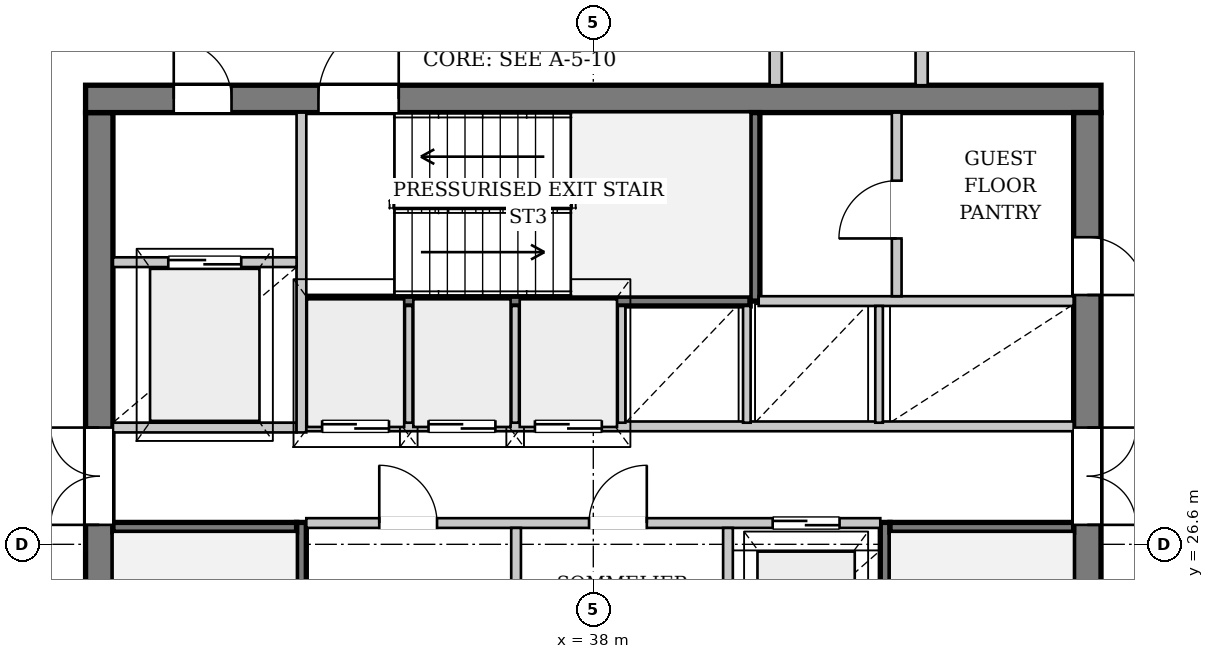
"""IFC4 building model, lengths in metres.
Left out: names, types, materials, properties, quantities, classifications, styles, units other than length and angle.
Written with IfcOpenShell. Run it as: python <this file> out.ifc"""

import sys

from ifc_helpers import new_model, si_unit, direction, frame, frame_2d, origin, place, context, subcontext, project, spatial, rectangle, extrude, source, transform, mapped, element, fill, save


model = new_model("IFC4")
c1 = context("Model", 3, precision=1e-05, world=origin(), true_north=direction((0.0, 1.0)))
c2 = subcontext(c1, "Body", "Model", "MODEL_VIEW")
j1 = project(units=[si_unit("LENGTHUNIT", "METRE"), si_unit("PLANEANGLEUNIT", "RADIAN")], contexts=[c1])
p1 = place(None, origin())
s1 = spatial("IfcSite", under=j1, at=p1, CompositionType="ELEMENT")
p2 = place(p1, origin())
s2 = spatial("IfcBuilding", under=s1, at=p2, CompositionType="ELEMENT")
p3 = place(p2, frame((0.0, 0.0, 274.1)))
s3 = spatial("IfcBuildingStorey", under=s2, at=p3, CompositionType="ELEMENT", Elevation=274.1)
p4 = place(p3, frame((51.126, 27.473, 0.0), z_axis=(0.0, 0.0, 1.0), x_axis=(-0.201040285464, -0.979582974342, 0.0)))
e1 = element("IfcWall", 1, at=p4, inside=s3, PredefinedType="SOLIDWALL", context=c2, shape_type="SweptSolid", body=[
    extrude(rectangle(XDim=22.119, YDim=0.32, at=frame_2d((11.06, 0.0))), origin(), (0.0, 0.0, 1.0), 2.812),
])
p5 = place(p4, frame((6.328, 0.0, 0.0)))
e2 = element("IfcOpeningElement", 2, at=p5, cuts=e1, PredefinedType="OPENING", context=c2, shape_type="SweptSolid", body=[
    extrude(rectangle(XDim=1.5, YDim=2.3, at=frame_2d((0.75, 1.15))), frame((0.0, 0.17, 0.0), z_axis=(0.0, -1.0, 0.0), x_axis=(1.0, 0.0, 0.0)), (0.0, 0.0, 1.0), 0.34),
])
p6 = place(p4, frame((15.268, 0.0, 0.342)))
e3 = element("IfcOpeningElement", 3, at=p6, cuts=e1, PredefinedType="OPENING", context=c2, shape_type="SweptSolid", body=[
    extrude(rectangle(XDim=2.6, YDim=2.35, at=frame_2d((1.3, 1.175))), frame((0.0, 0.17, 0.0), z_axis=(0.0, -1.0, 0.0), x_axis=(1.0, 0.0, 0.0)), (0.0, 0.0, 1.0), 0.34),
])
p7 = place(p3, frame((16.162, 25.477, 0.0), z_axis=(0.0, 0.0, 1.0), x_axis=(0.777216193482, 0.629233651825, 0.0)))
e4 = element("IfcWall", 4, at=p7, inside=s3, PredefinedType="SOLIDWALL", context=c2, shape_type="SweptSolid", body=[
    extrude(rectangle(XDim=21.611, YDim=0.38, at=frame_2d((10.805, 0.0))), origin(), (0.0, 0.0, 1.0), 2.812),
])
p8 = place(p7, frame((4.951, 0.0, 0.442)))
e5 = element("IfcOpeningElement", 5, at=p8, cuts=e4, PredefinedType="OPENING", context=c2, shape_type="SweptSolid", body=[
    extrude(rectangle(XDim=2.2, YDim=2.25, at=frame_2d((1.1, 1.125))), frame((0.0, 0.2, 0.0), z_axis=(0.0, -1.0, 0.0), x_axis=(1.0, 0.0, 0.0)), (0.0, 0.0, 1.0), 0.4),
])
p9 = place(p7, frame((17.46, 0.0, 0.442)))
e6 = element("IfcOpeningElement", 6, at=p9, cuts=e4, PredefinedType="OPENING", context=c2, shape_type="SweptSolid", body=[
    extrude(rectangle(XDim=2.2, YDim=2.25, at=frame_2d((1.1, 1.125))), frame((0.0, 0.2, 0.0), z_axis=(0.0, -1.0, 0.0), x_axis=(1.0, 0.0, 0.0)), (0.0, 0.0, 1.0), 0.4),
])
p10 = place(p3, frame((29.875, 19.5, 0.0), z_axis=(0.0, 0.0, 1.0), x_axis=(0.0, 1.0, 0.0)))
e7 = element("IfcWall", 7, at=p10, inside=s3, PredefinedType="SHEAR", context=c2, shape_type="SweptSolid", body=[
    extrude(rectangle(XDim=14.2, YDim=0.45, at=frame_2d((7.1, 0.0))), origin(), (0.0, 0.0, 1.0), 3.32),
])
p11 = place(p10, frame((7.42, 0.0, 0.0)))
e8 = element("IfcOpeningElement", 8, at=p11, cuts=e7, PredefinedType="OPENING", context=c2, shape_type="SweptSolid", body=[
    extrude(rectangle(XDim=1.6, YDim=2.2, at=frame_2d((0.8, 1.1))), frame((0.0, 0.235, 0.0), z_axis=(0.0, -1.0, 0.0), x_axis=(1.0, 0.0, 0.0)), (0.0, 0.0, 1.0), 0.47),
])
p12 = place(p3, frame((29.65, 33.925, 0.0), z_axis=(0.0, 0.0, 1.0), x_axis=(1.0, 0.0, 0.0)))
e9 = element("IfcWall", 9, at=p12, inside=s3, PredefinedType="SHEAR", context=c2, shape_type="SweptSolid", body=[
    extrude(rectangle(XDim=16.7, YDim=0.45, at=frame_2d((8.35, 0.0))), origin(), (0.0, 0.0, 1.0), 3.32),
])
p13 = place(p12, frame((1.45, 0.0, 0.0)))
e10 = element("IfcOpeningElement", 10, at=p13, cuts=e9, PredefinedType="OPENING", context=c2, shape_type="SweptSolid", body=[
    extrude(rectangle(XDim=0.95, YDim=2.1, at=frame_2d((0.475, 1.05))), frame((0.0, 0.235, 0.0), z_axis=(0.0, -1.0, 0.0), x_axis=(1.0, 0.0, 0.0)), (0.0, 0.0, 1.0), 0.47),
])
p14 = place(p12, frame((3.83, 0.0, 0.0)))
e11 = element("IfcOpeningElement", 11, at=p14, cuts=e9, PredefinedType="OPENING", context=c2, shape_type="SweptSolid", body=[
    extrude(rectangle(XDim=1.32, YDim=2.2, at=frame_2d((0.66, 1.1))), frame((0.0, 0.235, 0.0), z_axis=(0.0, -1.0, 0.0), x_axis=(1.0, 0.0, 0.0)), (0.0, 0.0, 1.0), 0.47),
])
p15 = place(p3, frame((46.125, 33.7, 0.0), z_axis=(0.0, 0.0, 1.0), x_axis=(0.0, -1.0, 0.0)))
e12 = element("IfcWall", 12, at=p15, inside=s3, PredefinedType="SHEAR", context=c2, shape_type="SweptSolid", body=[
    extrude(rectangle(XDim=14.2, YDim=0.45, at=frame_2d((7.1, 0.0))), origin(), (0.0, 0.0, 1.0), 3.32),
])
p16 = place(p15, frame((5.18, 0.0, 0.0)))
e13 = element("IfcOpeningElement", 13, at=p16, cuts=e12, PredefinedType="OPENING", context=c2, shape_type="SweptSolid", body=[
    extrude(rectangle(XDim=1.6, YDim=2.2, at=frame_2d((0.8, 1.1))), frame((0.0, 0.235, 0.0), z_axis=(0.0, -1.0, 0.0), x_axis=(1.0, 0.0, 0.0)), (0.0, 0.0, 1.0), 0.47),
])
p17 = place(p15, frame((2.05, 0.0, 0.0)))
e14 = element("IfcOpeningElement", 14, at=p17, cuts=e12, PredefinedType="OPENING", context=c2, shape_type="SweptSolid", body=[
    extrude(rectangle(XDim=0.95, YDim=2.1, at=frame_2d((0.475, 1.05))), frame((0.0, 0.235, 0.0), z_axis=(0.0, -1.0, 0.0), x_axis=(1.0, 0.0, 0.0)), (0.0, 0.0, 1.0), 0.47),
])
p18 = place(p3, frame((33.2, 19.5, 0.0), z_axis=(0.0, 0.0, 1.0), x_axis=(0.0, 1.0, 0.0)))
e15 = element("IfcWall", 15, at=p18, inside=s3, PredefinedType="PARTITIONING", context=c2, shape_type="SweptSolid", body=[
    extrude(rectangle(XDim=7.46, YDim=0.16, at=frame_2d((3.73, 0.0))), origin(), (0.0, 0.0, 1.0), 3.32),
])
p19 = place(p18, frame((0.08, 0.0, 0.0)))
e16 = element("IfcOpeningElement", 16, at=p19, cuts=e15, PredefinedType="OPENING", context=c2, shape_type="SweptSolid", body=[
    extrude(rectangle(XDim=1.32, YDim=2.2, at=frame_2d((0.66, 1.1))), frame((0.0, 0.09, 0.0), z_axis=(0.0, -1.0, 0.0), x_axis=(1.0, 0.0, 0.0)), (0.0, 0.0, 1.0), 0.18),
])
p20 = place(p3, frame((30.1, 26.88, 0.0), z_axis=(0.0, 0.0, 1.0), x_axis=(1.0, 0.0, 0.0)))
e17 = element("IfcWall", 17, at=p20, inside=s3, PredefinedType="PARTITIONING", context=c2, shape_type="SweptSolid", body=[
    extrude(rectangle(XDim=3.02, YDim=0.16, at=frame_2d((1.51, 0.0))), origin(), (0.0, 0.0, 1.0), 3.32),
])
p21 = place(p3, frame((42.8, 26.96, 0.0), z_axis=(0.0, 0.0, 1.0), x_axis=(0.0, -1.0, 0.0)))
e18 = element("IfcWall", 18, at=p21, inside=s3, PredefinedType="PARTITIONING", context=c2, shape_type="SweptSolid", body=[
    extrude(rectangle(XDim=7.46, YDim=0.16, at=frame_2d((3.73, 0.0))), origin(), (0.0, 0.0, 1.0), 3.32),
])
p22 = place(p21, frame((6.06, 0.0, 0.0)))
e19 = element("IfcOpeningElement", 19, at=p22, cuts=e18, PredefinedType="OPENING", context=c2, shape_type="SweptSolid", body=[
    extrude(rectangle(XDim=1.32, YDim=2.2, at=frame_2d((0.66, 1.1))), frame((0.0, 0.09, 0.0), z_axis=(0.0, -1.0, 0.0), x_axis=(1.0, 0.0, 0.0)), (0.0, 0.0, 1.0), 0.18),
])
p23 = place(p3, frame((42.88, 26.88, 0.0), z_axis=(0.0, 0.0, 1.0), x_axis=(1.0, 0.0, 0.0)))
e20 = element("IfcWall", 20, at=p23, inside=s3, PredefinedType="PARTITIONING", context=c2, shape_type="SweptSolid", body=[
    extrude(rectangle(XDim=3.02, YDim=0.16, at=frame_2d((1.51, 0.0))), origin(), (0.0, 0.0, 1.0), 3.32),
])
p24 = place(p3, frame((33.28, 30.6, 0.0), z_axis=(0.0, 0.0, 1.0), x_axis=(1.0, 0.0, 0.0)))
e21 = element("IfcWall", 21, at=p24, inside=s3, PredefinedType="PARTITIONING", context=c2, shape_type="SweptSolid", body=[
    extrude(rectangle(XDim=7.3, YDim=0.16, at=frame_2d((3.65, 0.0))), origin(), (0.0, 0.0, 1.0), 3.32),
])
p25 = place(p3, frame((40.66, 30.6, 0.0), z_axis=(0.0, 0.0, 1.0), x_axis=(0.0, 1.0, 0.0)))
e22 = element("IfcWall", 22, at=p25, inside=s3, PredefinedType="PARTITIONING", context=c2, shape_type="SweptSolid", body=[
    extrude(rectangle(XDim=3.1, YDim=0.16, at=frame_2d((1.55, 0.0))), origin(), (0.0, 0.0, 1.0), 3.32),
])
p26 = place(p3, frame((30.1, 28.52, 0.0), z_axis=(0.0, 0.0, 1.0), x_axis=(1.0, 0.0, 0.0)))
e23 = element("IfcWall", 23, at=p26, inside=s3, PredefinedType="PARTITIONING", context=c2, shape_type="SweptSolid", body=[
    extrude(rectangle(XDim=3.02, YDim=0.16, at=frame_2d((1.51, 0.0))), origin(), (0.0, 0.0, 1.0), 3.32),
])
p27 = place(p3, frame((33.2, 28.44, 0.0), z_axis=(0.0, 0.0, 1.0), x_axis=(0.0, 1.0, 0.0)))
e24 = element("IfcWall", 24, at=p27, inside=s3, PredefinedType="PARTITIONING", context=c2, shape_type="SweptSolid", body=[
    extrude(rectangle(XDim=5.26, YDim=0.16, at=frame_2d((2.63, 0.0))), origin(), (0.0, 0.0, 1.0), 3.32),
])
p28 = place(p3, frame((30.1, 31.24, 0.0), z_axis=(0.0, 0.0, 1.0), x_axis=(1.0, 0.0, 0.0)))
e25 = element("IfcWall", 25, at=p28, inside=s3, PredefinedType="PARTITIONING", context=c2, shape_type="SweptSolid", body=[
    extrude(rectangle(XDim=3.02, YDim=0.16, at=frame_2d((1.51, 0.0))), origin(), (0.0, 0.0, 1.0), 3.32),
])
p29 = place(p28, frame((0.91, 0.0, 0.0)))
e26 = element("IfcOpeningElement", 26, at=p29, cuts=e25, PredefinedType="OPENING", context=c2, shape_type="SweptSolid", body=[
    extrude(rectangle(XDim=1.2, YDim=2.2, at=frame_2d((0.6, 1.1))), frame((0.0, 0.09, 0.0), z_axis=(0.0, -1.0, 0.0), x_axis=(1.0, 0.0, 0.0)), (0.0, 0.0, 1.0), 0.18),
])
p30 = place(p3, frame((33.28, 26.95, 0.0), z_axis=(0.0, 0.0, 1.0), x_axis=(1.0, 0.0, 0.0)))
e27 = element("IfcWall", 27, at=p30, inside=s3, PredefinedType="PARTITIONING", context=c2, shape_type="SweptSolid", body=[
    extrude(rectangle(XDim=9.44, YDim=0.16, at=frame_2d((4.72, 0.0))), origin(), (0.0, 0.0, 1.0), 3.32),
])
p31 = place(p30, frame((1.2, 0.0, 0.0)))
e28 = element("IfcOpeningElement", 28, at=p31, cuts=e27, PredefinedType="OPENING", context=c2, shape_type="SweptSolid", body=[
    extrude(rectangle(XDim=0.95, YDim=2.1, at=frame_2d((0.475, 1.05))), frame((0.0, 0.09, 0.0), z_axis=(0.0, -1.0, 0.0), x_axis=(1.0, 0.0, 0.0)), (0.0, 0.0, 1.0), 0.18),
])
p32 = place(p30, frame((4.65, 0.0, 0.0)))
e29 = element("IfcOpeningElement", 29, at=p32, cuts=e27, PredefinedType="OPENING", context=c2, shape_type="SweptSolid", body=[
    extrude(rectangle(XDim=0.95, YDim=2.1, at=frame_2d((0.475, 1.05))), frame((0.0, 0.09, 0.0), z_axis=(0.0, -1.0, 0.0), x_axis=(1.0, 0.0, 0.0)), (0.0, 0.0, 1.0), 0.18),
])
p33 = place(p30, frame((7.67, 0.0, 0.0)))
e30 = element("IfcOpeningElement", 30, at=p33, cuts=e27, PredefinedType="OPENING", context=c2, shape_type="SweptSolid", body=[
    extrude(rectangle(XDim=1.1, YDim=2.2, at=frame_2d((0.55, 1.1))), frame((0.0, 0.09, 0.0), z_axis=(0.0, -1.0, 0.0), x_axis=(1.0, 0.0, 0.0)), (0.0, 0.0, 1.0), 0.18),
])
for number, where, z_axis, x_axis in (
    (31, (36.73, 24.56, 0.0), (0.0, 0.0, 1.0), (0.0, 1.0, 0.0)),
    (32, (40.215, 24.56, 0.0), (0.0, 0.0, 1.0), (0.0, 1.0, 0.0)),
):
    element("IfcWall", number, at=place(p3, frame(where, z_axis=z_axis, x_axis=x_axis)), inside=s3, PredefinedType="PARTITIONING", context=c2, shape_type="SweptSolid", body=[
        extrude(rectangle(XDim=2.31, YDim=0.16, at=frame_2d((1.155, 0.0))), origin(), (0.0, 0.0, 1.0), 3.32),
    ])
p34 = place(p3, frame((33.28, 28.54, 0.0), z_axis=(0.0, 0.0, 1.0), x_axis=(1.0, 0.0, 0.0)))
e33 = element("IfcWall", 33, at=p34, inside=s3, PredefinedType="PARTITIONING", context=c2, shape_type="SweptSolid", body=[
    extrude(rectangle(XDim=12.62, YDim=0.16, at=frame_2d((6.31, 0.0))), origin(), (0.0, 0.0, 1.0), 3.32),
])
p35 = place(p34, frame((0.26, 0.0, 0.0)))
e34 = element("IfcOpeningElement", 34, at=p35, cuts=e33, PredefinedType="OPENING", context=c2, shape_type="SweptSolid", body=[
    extrude(rectangle(XDim=1.1, YDim=2.2, at=frame_2d((0.55, 1.1))), frame((0.0, 0.09, 0.0), z_axis=(0.0, -1.0, 0.0), x_axis=(1.0, 0.0, 0.0)), (0.0, 0.0, 1.0), 0.18),
])
p36 = place(p34, frame((2.01, 0.0, 0.0)))
e35 = element("IfcOpeningElement", 35, at=p36, cuts=e33, PredefinedType="OPENING", context=c2, shape_type="SweptSolid", body=[
    extrude(rectangle(XDim=1.1, YDim=2.2, at=frame_2d((0.55, 1.1))), frame((0.0, 0.09, 0.0), z_axis=(0.0, -1.0, 0.0), x_axis=(1.0, 0.0, 0.0)), (0.0, 0.0, 1.0), 0.18),
])
p37 = place(p34, frame((3.76, 0.0, 0.0)))
e36 = element("IfcOpeningElement", 36, at=p37, cuts=e33, PredefinedType="OPENING", context=c2, shape_type="SweptSolid", body=[
    extrude(rectangle(XDim=1.1, YDim=2.2, at=frame_2d((0.55, 1.1))), frame((0.0, 0.09, 0.0), z_axis=(0.0, -1.0, 0.0), x_axis=(1.0, 0.0, 0.0)), (0.0, 0.0, 1.0), 0.18),
])
p38 = place(p3, frame((40.72, 30.6, 0.0), z_axis=(0.0, 0.0, 1.0), x_axis=(1.0, 0.0, 0.0)))
e37 = element("IfcWall", 37, at=p38, inside=s3, PredefinedType="PARTITIONING", context=c2, shape_type="SweptSolid", body=[
    extrude(rectangle(XDim=5.18, YDim=0.16, at=frame_2d((2.59, 0.0))), origin(), (0.0, 0.0, 1.0), 3.32),
])
for number, where, z_axis, x_axis in (
    (38, (34.965, 28.6, 0.0), (0.0, 0.0, 1.0), (0.0, 1.0, 0.0)),
    (39, (36.715, 28.6, 0.0), (0.0, 0.0, 1.0), (0.0, 1.0, 0.0)),
    (40, (38.465, 28.6, 0.0), (0.0, 0.0, 1.0), (0.0, 1.0, 0.0)),
    (41, (40.525, 28.6, 0.0), (0.0, 0.0, 1.0), (0.0, 1.0, 0.0)),
    (42, (42.7, 28.6, 0.0), (0.0, 0.0, 1.0), (0.0, 1.0, 0.0)),
):
    element("IfcWall", number, at=place(p3, frame(where, z_axis=z_axis, x_axis=x_axis)), inside=s3, PredefinedType="PARTITIONING", context=c2, shape_type="SweptSolid", body=[
        extrude(rectangle(XDim=1.92, YDim=0.125, at=frame_2d((0.96, 0.0))), origin(), (0.0, 0.0, 1.0), 3.32),
    ])
p39 = place(p3, frame((42.99, 30.68, 0.0), z_axis=(0.0, 0.0, 1.0), x_axis=(0.0, 1.0, 0.0)))
e43 = element("IfcWall", 43, at=p39, inside=s3, PredefinedType="PARTITIONING", context=c2, shape_type="SweptSolid", body=[
    extrude(rectangle(XDim=3.02, YDim=0.16, at=frame_2d((1.51, 0.0))), origin(), (0.0, 0.0, 1.0), 3.32),
])
p40 = place(p39, frame((0.95, 0.0, 0.0)))
e44 = element("IfcOpeningElement", 44, at=p40, cuts=e43, PredefinedType="OPENING", context=c2, shape_type="SweptSolid", body=[
    extrude(rectangle(XDim=0.95, YDim=2.1, at=frame_2d((0.475, 1.05))), frame((0.0, 0.09, 0.0), z_axis=(0.0, -1.0, 0.0), x_axis=(1.0, 0.0, 0.0)), (0.0, 0.0, 1.0), 0.18),
])
p41 = place(p3, frame((41.0, 34.15, 0.0), z_axis=(0.0, 0.0, 1.0), x_axis=(0.0, 1.0, 0.0)))
e45 = element("IfcWall", 45, at=p41, inside=s3, PredefinedType="PARTITIONING", context=c2, shape_type="SweptSolid", body=[
    extrude(rectangle(XDim=1.85, YDim=0.2, at=frame_2d((0.925, 0.0))), origin(), (0.0, 0.0, 1.0), 3.32),
])
p42 = place(p3, frame((43.4, 34.15, 0.0), z_axis=(0.0, 0.0, 1.0), x_axis=(0.0, 1.0, 0.0)))
e46 = element("IfcWall", 46, at=p42, inside=s3, PredefinedType="PARTITIONING", context=c2, shape_type="SweptSolid", body=[
    extrude(rectangle(XDim=1.85, YDim=0.2, at=frame_2d((0.925, 0.0))), origin(), (0.0, 0.0, 1.0), 2.995),
])
m1 = source(origin(), c2, "Body", "SweptSolid", [
    extrude(rectangle(XDim=1.6, YDim=2.2, at=frame_2d((0.8, 1.1))), frame((0.0, 0.025, 0.0), z_axis=(0.0, -1.0, 0.0), x_axis=(1.0, 0.0, 0.0)), (0.0, 0.0, 1.0), 0.05),
])
p43 = place(p11, origin())
e47 = element("IfcDoor", 47, at=p43, inside=s3, OperationType="DOUBLE_DOOR_SINGLE_SWING", PredefinedType="DOOR", context=c2, shape_type="MappedRepresentation", body=[
    mapped(m1, transform((0.0, 0.0, 0.0), x_axis=(1.0, 0.0, 0.0), y_axis=(0.0, 1.0, 0.0), z_axis=(0.0, 0.0, 1.0), scale=1.0)),
])
fill(e8, e47)
m2 = source(origin(), c2, "Body", "SweptSolid", [
    extrude(rectangle(XDim=0.95, YDim=2.1, at=frame_2d((0.475, 1.05))), frame((0.0, 0.025, 0.0), z_axis=(0.0, -1.0, 0.0), x_axis=(1.0, 0.0, 0.0)), (0.0, 0.0, 1.0), 0.05),
])
p44 = place(p13, origin())
e48 = element("IfcDoor", 48, at=p44, inside=s3, OperationType="SINGLE_SWING_LEFT", PredefinedType="DOOR", context=c2, shape_type="MappedRepresentation", body=[
    mapped(m2, transform((0.0, 0.0, 0.0), x_axis=(1.0, 0.0, 0.0), y_axis=(0.0, 1.0, 0.0), z_axis=(0.0, 0.0, 1.0), scale=1.0)),
])
fill(e10, e48)
m3 = source(origin(), c2, "Body", "SweptSolid", [
    extrude(rectangle(XDim=1.32, YDim=2.2, at=frame_2d((0.66, 1.1))), frame((0.0, 0.025, 0.0), z_axis=(0.0, -1.0, 0.0), x_axis=(1.0, 0.0, 0.0)), (0.0, 0.0, 1.0), 0.05),
])
p45 = place(p14, origin())
e49 = element("IfcDoor", 49, at=p45, inside=s3, OperationType="SINGLE_SWING_RIGHT", PredefinedType="DOOR", context=c2, shape_type="MappedRepresentation", body=[
    mapped(m3, transform((0.0, 0.0, 0.0), x_axis=(1.0, 0.0, 0.0), y_axis=(0.0, 1.0, 0.0), z_axis=(0.0, 0.0, 1.0), scale=1.0)),
])
fill(e11, e49)
p46 = place(p16, origin())
e50 = element("IfcDoor", 50, at=p46, inside=s3, OperationType="DOUBLE_DOOR_SINGLE_SWING", PredefinedType="DOOR", context=c2, shape_type="MappedRepresentation", body=[
    mapped(m1, transform((0.0, 0.0, 0.0), x_axis=(1.0, 0.0, 0.0), y_axis=(0.0, 1.0, 0.0), z_axis=(0.0, 0.0, 1.0), scale=1.0)),
])
fill(e13, e50)
m4 = source(origin(), c2, "Body", "SweptSolid", [
    extrude(rectangle(XDim=1.2, YDim=2.2, at=frame_2d((0.6, 1.1))), frame((0.0, 0.025, 0.0), z_axis=(0.0, -1.0, 0.0), x_axis=(1.0, 0.0, 0.0)), (0.0, 0.0, 1.0), 0.05),
])
p47 = place(p29, origin())
e51 = element("IfcDoor", 51, at=p47, inside=s3, OperationType="DOUBLE_DOOR_SLIDING", PredefinedType="DOOR", context=c2, shape_type="MappedRepresentation", body=[
    mapped(m4, transform((0.0, 0.0, 0.0), x_axis=(1.0, 0.0, 0.0), y_axis=(0.0, 1.0, 0.0), z_axis=(0.0, 0.0, 1.0), scale=1.0)),
])
fill(e26, e51)
p48 = place(p31, origin())
e52 = element("IfcDoor", 52, at=p48, inside=s3, OperationType="SINGLE_SWING_LEFT", PredefinedType="DOOR", context=c2, shape_type="MappedRepresentation", body=[
    mapped(m2, transform((0.0, 0.0, 0.0), x_axis=(1.0, 0.0, 0.0), y_axis=(0.0, 1.0, 0.0), z_axis=(0.0, 0.0, 1.0), scale=1.0)),
])
fill(e28, e52)
p49 = place(p32, origin())
e53 = element("IfcDoor", 53, at=p49, inside=s3, OperationType="SINGLE_SWING_RIGHT", PredefinedType="DOOR", context=c2, shape_type="MappedRepresentation", body=[
    mapped(m2, transform((0.0, 0.0, 0.0), x_axis=(1.0, 0.0, 0.0), y_axis=(0.0, 1.0, 0.0), z_axis=(0.0, 0.0, 1.0), scale=1.0)),
])
fill(e29, e53)
m5 = source(origin(), c2, "Body", "SweptSolid", [
    extrude(rectangle(XDim=1.1, YDim=2.2, at=frame_2d((0.55, 1.1))), frame((0.0, 0.025, 0.0), z_axis=(0.0, -1.0, 0.0), x_axis=(1.0, 0.0, 0.0)), (0.0, 0.0, 1.0), 0.05),
])
p50 = place(p33, origin())
e54 = element("IfcDoor", 54, at=p50, inside=s3, OperationType="DOUBLE_DOOR_SLIDING", PredefinedType="DOOR", context=c2, shape_type="MappedRepresentation", body=[
    mapped(m5, transform((0.0, 0.0, 0.0), x_axis=(1.0, 0.0, 0.0), y_axis=(0.0, 1.0, 0.0), z_axis=(0.0, 0.0, 1.0), scale=1.0)),
])
fill(e30, e54)
p51 = place(p35, origin())
e55 = element("IfcDoor", 55, at=p51, inside=s3, OperationType="DOUBLE_DOOR_SLIDING", PredefinedType="DOOR", context=c2, shape_type="MappedRepresentation", body=[
    mapped(m5, transform((0.0, 0.0, 0.0), x_axis=(1.0, 0.0, 0.0), y_axis=(0.0, 1.0, 0.0), z_axis=(0.0, 0.0, 1.0), scale=1.0)),
])
fill(e34, e55)
p52 = place(p36, origin())
e56 = element("IfcDoor", 56, at=p52, inside=s3, OperationType="DOUBLE_DOOR_SLIDING", PredefinedType="DOOR", context=c2, shape_type="MappedRepresentation", body=[
    mapped(m5, transform((0.0, 0.0, 0.0), x_axis=(1.0, 0.0, 0.0), y_axis=(0.0, 1.0, 0.0), z_axis=(0.0, 0.0, 1.0), scale=1.0)),
])
fill(e35, e56)
p53 = place(p37, origin())
e57 = element("IfcDoor", 57, at=p53, inside=s3, OperationType="DOUBLE_DOOR_SLIDING", PredefinedType="DOOR", context=c2, shape_type="MappedRepresentation", body=[
    mapped(m5, transform((0.0, 0.0, 0.0), x_axis=(1.0, 0.0, 0.0), y_axis=(0.0, 1.0, 0.0), z_axis=(0.0, 0.0, 1.0), scale=1.0)),
])
fill(e36, e57)
p54 = place(p40, origin())
e58 = element("IfcDoor", 58, at=p54, inside=s3, OperationType="SINGLE_SWING_LEFT", PredefinedType="DOOR", context=c2, shape_type="MappedRepresentation", body=[
    mapped(m2, transform((0.0, 0.0, 0.0), x_axis=(1.0, 0.0, 0.0), y_axis=(0.0, 1.0, 0.0), z_axis=(0.0, 0.0, 1.0), scale=1.0)),
])
fill(e44, e58)
p55 = place(p17, origin())
e59 = element("IfcDoor", 59, at=p55, inside=s3, OperationType="SINGLE_SWING_RIGHT", PredefinedType="DOOR", context=c2, shape_type="MappedRepresentation", body=[
    mapped(m2, transform((0.0, 0.0, 0.0), x_axis=(1.0, 0.0, 0.0), y_axis=(0.0, 1.0, 0.0), z_axis=(0.0, 0.0, 1.0), scale=1.0)),
])
fill(e14, e59)
save(model, sys.argv[1])
